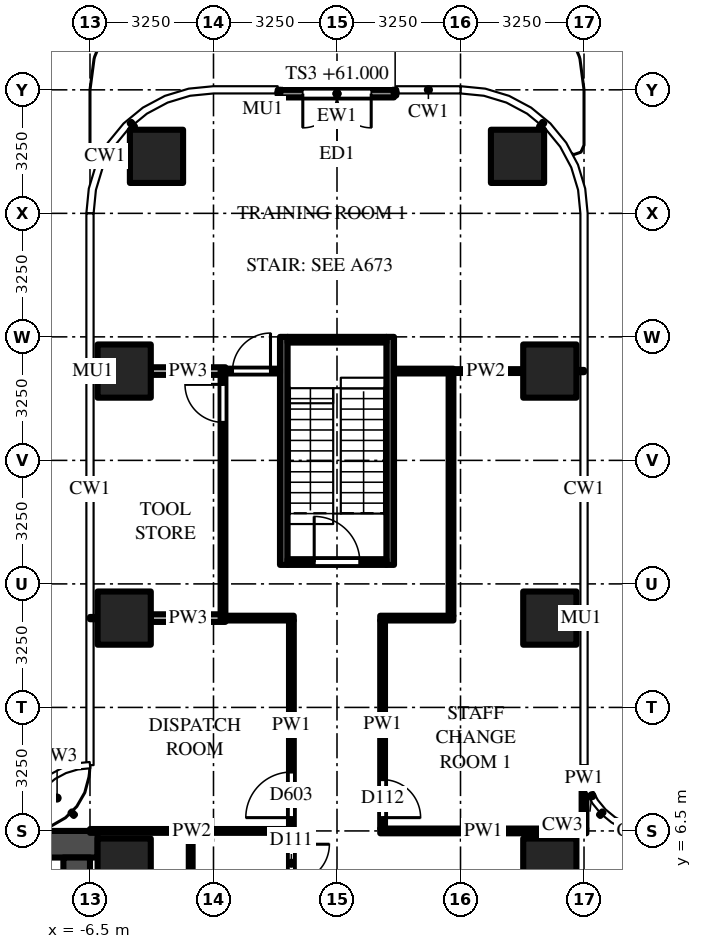
"""IFC4 building model, lengths in metres.
Left out: names, types, materials, properties, quantities, classifications, styles, units other than length and angle.
Written with IfcOpenShell. Run it as: python <this file> out.ifc"""

import sys

from ifc_helpers import new_model, si_unit, direction, frame, frame_2d, origin, origin_2d, place, context, subcontext, project, spatial, rectangle, extrude, source, transform, mapped, element, fill, save


model = new_model("IFC4")
c1 = context("Model", 3, precision=1e-05, world=origin(), true_north=direction((0.0, 1.0)))
c2 = subcontext(c1, "Body", "Model", "MODEL_VIEW")
j1 = project(units=[si_unit("LENGTHUNIT", "METRE"), si_unit("PLANEANGLEUNIT", "RADIAN")], contexts=[c1])
p1 = place(None, origin())
s1 = spatial("IfcSite", under=j1, at=p1, CompositionType="ELEMENT")
p2 = place(p1, origin())
s2 = spatial("IfcBuilding", under=s1, at=p2, CompositionType="ELEMENT")
p3 = place(p2, frame((0.0, 0.0, 61.0)))
s3 = spatial("IfcBuildingStorey", under=s2, at=p3, CompositionType="ELEMENT", Elevation=61.0)
m1 = source(origin(), c2, "Body", "SweptSolid", [
    extrude(rectangle(XDim=1.4, YDim=1.4, at=origin_2d()), origin(), (0.0, 0.0, 1.0), 4.5),
])
for number, where, z_axis, x_axis in (
    (1, (-5.6, 12.1, 0.0), (0.0, 0.0, 1.0), (1.0, 0.0, 0.0)),
    (2, (-5.6, 18.6, 0.0), (0.0, 0.0, 1.0), (1.0, 0.0, 0.0)),
    (3, (-4.75, 24.25, 0.0), (0.0, 0.0, 1.0), (1.0, 0.0, 0.0)),
    (4, (5.6, 12.1, 0.0), (0.0, 0.0, 1.0), (1.0, 0.0, 0.0)),
    (5, (5.6, 18.6, 0.0), (0.0, 0.0, 1.0), (1.0, 0.0, 0.0)),
    (6, (4.75, 24.25, 0.0), (0.0, 0.0, 1.0), (1.0, 0.0, 0.0)),
    (7, (5.6, 5.6, 0.0), (0.0, 0.0, 1.0), (1.0, 0.0, 0.0)),
    (8, (-5.6, 5.6, 0.0), (0.0, 0.0, 1.0), (1.0, 0.0, 0.0)),
):
    element("IfcColumn", number, at=place(p3, frame(where, z_axis=z_axis, x_axis=x_axis)), inside=s3, PredefinedType="COLUMN", context=c2, shape_type="MappedRepresentation", body=[
        mapped(m1, transform((0.0, 0.0, 0.0))),
    ])
m2 = source(origin(), c2, "Body", "SweptSolid", [
    extrude(rectangle(XDim=16.45, YDim=0.7, at=frame_2d((8.225, 0.0))), origin(), (0.0, 0.0, 1.0), 4.25),
])
p4 = place(p3, frame((-6.3, 6.15, 0.0), z_axis=(0.0, 0.0, 1.0), x_axis=(-1.0, 0.0, 0.0)))
e9 = element("IfcWall", 9, at=p4, inside=s3, PredefinedType="SHEAR", context=c2, shape_type="MappedRepresentation", body=[
    mapped(m2, transform((0.0, 0.0, 0.0))),
])
m3 = source(origin(), c2, "Body", "SweptSolid", [
    extrude(rectangle(XDim=9.05, YDim=0.7, at=frame_2d((4.525, 0.0))), origin(), (0.0, 0.0, 1.0), 4.25),
])
p5 = place(p3, frame((-6.85, 5.8, 0.0), z_axis=(0.0, 0.0, 1.0), x_axis=(0.0, -1.0, 0.0)))
e10 = element("IfcWall", 10, at=p5, inside=s3, PredefinedType="SHEAR", context=c2, shape_type="MappedRepresentation", body=[
    mapped(m3, transform((0.0, 0.0, 0.0))),
])
m4 = source(origin(), c2, "Body", "SweptSolid", [
    extrude(rectangle(XDim=1.8, YDim=2.1, at=frame_2d((0.9, 1.05))), frame((0.0, 0.36, 0.0), z_axis=(0.0, -1.0, 0.0), x_axis=(1.0, 0.0, 0.0)), (0.0, 0.0, 1.0), 0.72),
])
p6 = place(p5, frame((3.15, 0.0, 0.0)))
e11 = element("IfcOpeningElement", 11, at=p6, cuts=e10, PredefinedType="OPENING", context=c2, shape_type="MappedRepresentation", body=[
    mapped(m4, transform((0.0, 0.0, 0.0))),
])
m5 = source(origin(), c2, "Body", "SweptSolid", [
    extrude(rectangle(XDim=6.0, YDim=0.2, at=frame_2d((3.0, 0.0))), origin(), (0.0, 0.0, 1.0), 4.25),
])
for number, where, z_axis, x_axis in (
    (12, (-1.4, 13.5, 0.0), (0.0, 0.0, 1.0), (0.0, 1.0, 0.0)),
    (13, (1.4, 13.5, 0.0), (0.0, 0.0, 1.0), (0.0, 1.0, 0.0)),
):
    element("IfcWall", number, at=place(p3, frame(where, z_axis=z_axis, x_axis=x_axis)), inside=s3, PredefinedType="SHEAR", context=c2, shape_type="MappedRepresentation", body=[
        mapped(m5, transform((0.0, 0.0, 0.0))),
    ])
m6 = source(origin(), c2, "Body", "SweptSolid", [
    extrude(rectangle(XDim=2.6, YDim=0.15, at=frame_2d((1.3, 0.0))), origin(), (0.0, 0.0, 1.0), 4.25),
])
p7 = place(p3, frame((-1.3, 13.575, 0.0), z_axis=(0.0, 0.0, 1.0), x_axis=(1.0, 0.0, 0.0)))
e14 = element("IfcWall", 14, at=p7, inside=s3, PredefinedType="SHEAR", context=c2, shape_type="MappedRepresentation", body=[
    mapped(m6, transform((0.0, 0.0, 0.0))),
])
m7 = source(origin(), c2, "Body", "SweptSolid", [
    extrude(rectangle(XDim=1.2, YDim=2.1, at=frame_2d((0.6, 1.05))), frame((0.0, 0.085, 0.0), z_axis=(0.0, -1.0, 0.0), x_axis=(1.0, 0.0, 0.0)), (0.0, 0.0, 1.0), 0.17),
])
p8 = place(p7, frame((0.7, 0.0, 0.0)))
e15 = element("IfcOpeningElement", 15, at=p8, cuts=e14, PredefinedType="OPENING", context=c2, shape_type="MappedRepresentation", body=[
    mapped(m7, transform((0.0, 0.0, 0.0))),
])
p9 = place(p3, frame((-1.3, 19.425, 0.0), z_axis=(0.0, 0.0, 1.0), x_axis=(1.0, 0.0, 0.0)))
e16 = element("IfcWall", 16, at=p9, inside=s3, PredefinedType="SHEAR", context=c2, shape_type="MappedRepresentation", body=[
    mapped(m6, transform((0.0, 0.0, 0.0))),
])
m8 = source(origin(), c2, "Body", "SweptSolid", [
    extrude(rectangle(XDim=3.0, YDim=0.2, at=frame_2d((1.5, 0.0))), origin(), (0.0, 0.0, 1.0), 4.25),
])
p10 = place(p3, frame((1.5, 25.9, 0.0), z_axis=(0.0, 0.0, 1.0), x_axis=(-1.0, 0.0, 0.0)))
e17 = element("IfcWall", 17, at=p10, inside=s3, PredefinedType="SOLIDWALL", context=c2, shape_type="MappedRepresentation", body=[
    mapped(m8, transform((0.0, 0.0, 0.0))),
])
m9 = source(origin(), c2, "Body", "SweptSolid", [
    extrude(rectangle(XDim=1.8, YDim=2.4, at=frame_2d((0.9, 1.2))), frame((0.0, 0.11, 0.0), z_axis=(0.0, -1.0, 0.0), x_axis=(1.0, 0.0, 0.0)), (0.0, 0.0, 1.0), 0.22),
])
p11 = place(p10, frame((0.6, 0.0, 0.0)))
e18 = element("IfcOpeningElement", 18, at=p11, cuts=e17, PredefinedType="OPENING", context=c2, shape_type="MappedRepresentation", body=[
    mapped(m9, transform((0.0, 0.0, 0.0))),
])
m10 = source(origin(), c2, "Body", "SweptSolid", [
    extrude(rectangle(XDim=3.137, YDim=0.1, at=frame_2d((1.569, 0.0))), origin(), (0.0, 0.0, 1.0), 3.468),
])
p12 = place(p3, frame((-3.85, 3.312, 0.0), z_axis=(0.0, 0.0, 1.0), x_axis=(0.0, 1.0, 0.0)))
e19 = element("IfcWall", 19, at=p12, inside=s3, PredefinedType="PARTITIONING", context=c2, shape_type="MappedRepresentation", body=[
    mapped(m10, transform((0.0, 0.0, 0.0))),
])
m11 = source(origin(), c2, "Body", "SweptSolid", [
    extrude(rectangle(XDim=6.3, YDim=0.125, at=frame_2d((3.15, 0.0))), origin(), (0.0, 0.0, 1.0), 3.468),
])
p13 = place(p3, frame((-3.0, 12.2, 0.0), z_axis=(0.0, 0.0, 1.0), x_axis=(0.0, 1.0, 0.0)))
e20 = element("IfcWall", 20, at=p13, inside=s3, PredefinedType="PARTITIONING", context=c2, shape_type="MappedRepresentation", body=[
    mapped(m11, transform((0.0, 0.0, 0.0))),
])
m12 = source(origin(), c2, "Body", "SweptSolid", [
    extrude(rectangle(XDim=1.0, YDim=2.1, at=frame_2d((0.5, 1.05))), frame((0.0, 0.073, 0.0), z_axis=(0.0, -1.0, 0.0), x_axis=(1.0, 0.0, 0.0)), (0.0, 0.0, 1.0), 0.145),
])
p14 = place(p13, frame((5.05, 0.0, 0.0)))
e21 = element("IfcOpeningElement", 21, at=p14, cuts=e20, PredefinedType="OPENING", context=c2, shape_type="MappedRepresentation", body=[
    mapped(m12, transform((0.0, 0.0, 0.0))),
])
m13 = source(origin(), c2, "Body", "SweptSolid", [
    extrude(rectangle(XDim=3.137, YDim=0.125, at=frame_2d((1.569, 0.0))), origin(), (0.0, 0.0, 1.0), 3.468),
])
p15 = place(p3, frame((-1.2, 6.45, 0.0), z_axis=(0.0, 0.0, 1.0), x_axis=(0.0, -1.0, 0.0)))
e22 = element("IfcWall", 22, at=p15, inside=s3, PredefinedType="PARTITIONING", context=c2, shape_type="MappedRepresentation", body=[
    mapped(m13, transform((0.0, 0.0, 0.0))),
])
p16 = place(p15, frame((0.3, 0.0, 0.0)))
e23 = element("IfcOpeningElement", 23, at=p16, cuts=e22, PredefinedType="OPENING", context=c2, shape_type="MappedRepresentation", body=[
    mapped(m12, transform((0.0, 0.0, 0.0))),
])
m14 = source(origin(), c2, "Body", "SweptSolid", [
    extrude(rectangle(XDim=5.488, YDim=0.125, at=frame_2d((2.744, 0.0))), origin(), (0.0, 0.0, 1.0), 3.468),
])
p17 = place(p3, frame((-1.2, 6.55, 0.0), z_axis=(0.0, 0.0, 1.0), x_axis=(0.0, 1.0, 0.0)))
e24 = element("IfcWall", 24, at=p17, inside=s3, PredefinedType="PARTITIONING", context=c2, shape_type="MappedRepresentation", body=[
    mapped(m14, transform((0.0, 0.0, 0.0))),
])
m15 = source(origin(), c2, "Body", "SweptSolid", [
    extrude(rectangle(XDim=1.2, YDim=2.1, at=frame_2d((0.6, 1.05))), frame((0.0, 0.073, 0.0), z_axis=(0.0, -1.0, 0.0), x_axis=(1.0, 0.0, 0.0)), (0.0, 0.0, 1.0), 0.145),
])
p18 = place(p17, frame((0.3, 0.0, 0.0)))
e25 = element("IfcOpeningElement", 25, at=p18, cuts=e24, PredefinedType="OPENING", context=c2, shape_type="MappedRepresentation", body=[
    mapped(m15, transform((0.0, 0.0, 0.0))),
])
m16 = source(origin(), c2, "Body", "SweptSolid", [
    extrude(rectangle(XDim=5.475, YDim=0.125, at=frame_2d((2.738, 0.0))), origin(), (0.0, 0.0, 1.0), 3.468),
])
p19 = place(p3, frame((1.2, 12.038, 0.0), z_axis=(0.0, 0.0, 1.0), x_axis=(0.0, -1.0, 0.0)))
e26 = element("IfcWall", 26, at=p19, inside=s3, PredefinedType="PARTITIONING", context=c2, shape_type="MappedRepresentation", body=[
    mapped(m16, transform((0.0, 0.0, 0.0))),
])
p20 = place(p19, frame((4.188, 0.0, 0.0)))
e27 = element("IfcOpeningElement", 27, at=p20, cuts=e26, PredefinedType="OPENING", context=c2, shape_type="MappedRepresentation", body=[
    mapped(m12, transform((0.0, 0.0, 0.0))),
])
m17 = source(origin(), c2, "Body", "SweptSolid", [
    extrude(rectangle(XDim=6.387, YDim=0.125, at=frame_2d((3.194, 0.0))), origin(), (0.0, 0.0, 1.0), 3.468),
])
p21 = place(p3, frame((3.0, 18.55, 0.0), z_axis=(0.0, 0.0, 1.0), x_axis=(0.0, -1.0, 0.0)))
e28 = element("IfcWall", 28, at=p21, inside=s3, PredefinedType="PARTITIONING", context=c2, shape_type="MappedRepresentation", body=[
    mapped(m17, transform((0.0, 0.0, 0.0))),
])
m18 = source(origin(), c2, "Body", "SweptSolid", [
    extrude(rectangle(XDim=1.469, YDim=0.125, at=frame_2d((0.734, 0.0))), origin(), (0.0, 0.0, 1.0), 4.25),
])
p22 = place(p3, frame((6.5, 6.562, 0.0), z_axis=(0.0, 0.0, 1.0), x_axis=(0.0, 1.0, 0.0)))
e29 = element("IfcWall", 29, at=p22, inside=s3, PredefinedType="PARTITIONING", context=c2, shape_type="MappedRepresentation", body=[
    mapped(m18, transform((0.0, 0.0, 0.0))),
])
m19 = source(origin(), c2, "Body", "SweptSolid", [
    extrude(rectangle(XDim=5.363, YDim=0.1, at=frame_2d((2.681, 0.0))), origin(), (0.0, 0.0, 1.0), 3.33),
])
p23 = place(p3, frame((-6.5, 6.5, 0.0), z_axis=(0.0, 0.0, 1.0), x_axis=(1.0, 0.0, 0.0)))
e30 = element("IfcWall", 30, at=p23, inside=s3, PredefinedType="PARTITIONING", context=c2, shape_type="MappedRepresentation", body=[
    mapped(m19, transform((0.0, 0.0, 0.0))),
])
m20 = source(origin(), c2, "Body", "SweptSolid", [
    extrude(rectangle(XDim=5.425, YDim=0.125, at=frame_2d((2.712, 0.0))), origin(), (0.0, 0.0, 1.0), 3.33),
])
p24 = place(p3, frame((1.137, 6.5, 0.0), z_axis=(0.0, 0.0, 1.0), x_axis=(1.0, 0.0, 0.0)))
e31 = element("IfcWall", 31, at=p24, inside=s3, PredefinedType="PARTITIONING", context=c2, shape_type="MappedRepresentation", body=[
    mapped(m20, transform((0.0, 0.0, 0.0))),
])
m21 = source(origin(), c2, "Body", "SweptSolid", [
    extrude(rectangle(XDim=1.962, YDim=0.2, at=frame_2d((0.981, 0.0))), origin(), (0.0, 0.0, 1.0), 3.468),
])
p25 = place(p3, frame((-4.9, 12.1, 0.0), z_axis=(0.0, 0.0, 1.0), x_axis=(1.0, 0.0, 0.0)))
e32 = element("IfcWall", 32, at=p25, inside=s3, PredefinedType="PARTITIONING", context=c2, shape_type="MappedRepresentation", body=[
    mapped(m21, transform((0.0, 0.0, 0.0))),
])
m22 = source(origin(), c2, "Body", "SweptSolid", [
    extrude(rectangle(XDim=1.925, YDim=0.125, at=frame_2d((0.962, 0.0))), origin(), (0.0, 0.0, 1.0), 3.468),
])
for number, where, z_axis, x_axis in (
    (33, (-1.137, 12.1, 0.0), (0.0, 0.0, 1.0), (-1.0, 0.0, 0.0)),
    (34, (3.062, 12.1, 0.0), (0.0, 0.0, 1.0), (-1.0, 0.0, 0.0)),
):
    element("IfcWall", number, at=place(p3, frame(where, z_axis=z_axis, x_axis=x_axis)), inside=s3, PredefinedType="PARTITIONING", context=c2, shape_type="MappedRepresentation", body=[
        mapped(m22, transform((0.0, 0.0, 0.0))),
    ])
m23 = source(origin(), c2, "Body", "SweptSolid", [
    extrude(rectangle(XDim=1.962, YDim=0.2, at=frame_2d((0.981, 0.0))), origin(), (0.0, 0.0, 1.0), 3.697),
])
p26 = place(p3, frame((-4.9, 18.6, 0.0), z_axis=(0.0, 0.0, 1.0), x_axis=(1.0, 0.0, 0.0)))
e35 = element("IfcWall", 35, at=p26, inside=s3, PredefinedType="PARTITIONING", context=c2, shape_type="MappedRepresentation", body=[
    mapped(m23, transform((0.0, 0.0, 0.0))),
])
m24 = source(origin(), c2, "Body", "SweptSolid", [
    extrude(rectangle(XDim=1.962, YDim=0.1, at=frame_2d((0.981, 0.0))), origin(), (0.0, 0.0, 1.0), 3.697),
])
p27 = place(p3, frame((2.938, 18.6, 0.0), z_axis=(0.0, 0.0, 1.0), x_axis=(1.0, 0.0, 0.0)))
e36 = element("IfcWall", 36, at=p27, inside=s3, PredefinedType="PARTITIONING", context=c2, shape_type="MappedRepresentation", body=[
    mapped(m24, transform((0.0, 0.0, 0.0))),
])
m25 = source(origin(), c2, "Body", "SweptSolid", [
    extrude(rectangle(XDim=1.562, YDim=0.125, at=frame_2d((0.781, 0.0))), origin(), (0.0, 0.0, 1.0), 3.697),
])
p28 = place(p3, frame((-3.062, 18.6, 0.0), z_axis=(0.0, 0.0, 1.0), x_axis=(1.0, 0.0, 0.0)))
e37 = element("IfcWall", 37, at=p28, inside=s3, PredefinedType="PARTITIONING", context=c2, shape_type="MappedRepresentation", body=[
    mapped(m25, transform((0.0, 0.0, 0.0))),
])
p29 = place(p28, frame((0.312, 0.0, 0.0)))
e38 = element("IfcOpeningElement", 38, at=p29, cuts=e37, PredefinedType="OPENING", context=c2, shape_type="MappedRepresentation", body=[
    mapped(m12, transform((0.0, 0.0, 0.0))),
])
p30 = place(p3, frame((1.5, 18.6, 0.0), z_axis=(0.0, 0.0, 1.0), x_axis=(1.0, 0.0, 0.0)))
e39 = element("IfcWall", 39, at=p30, inside=s3, PredefinedType="PARTITIONING", context=c2, shape_type="MappedRepresentation", body=[
    mapped(m25, transform((0.0, 0.0, 0.0))),
])
m26 = source(origin(), c2, "Body", "SweptSolid", [
    extrude(rectangle(XDim=1.2, YDim=2.1, at=frame_2d((0.6, 1.05))), frame((0.0, 0.025, 0.0), z_axis=(0.0, -1.0, 0.0), x_axis=(1.0, 0.0, 0.0)), (0.0, 0.0, 1.0), 0.05),
])
p31 = place(p8, origin())
e40 = element("IfcDoor", 40, at=p31, inside=s3, OperationType="SINGLE_SWING_LEFT", PredefinedType="DOOR", context=c2, shape_type="MappedRepresentation", body=[
    mapped(m26, transform((0.0, 0.0, 0.0))),
])
fill(e15, e40)
m27 = source(origin(), c2, "Body", "SweptSolid", [
    extrude(rectangle(XDim=1.8, YDim=2.4, at=frame_2d((0.9, 1.2))), frame((0.0, 0.025, 0.0), z_axis=(0.0, -1.0, 0.0), x_axis=(1.0, 0.0, 0.0)), (0.0, 0.0, 1.0), 0.05),
])
p32 = place(p11, origin())
e41 = element("IfcDoor", 41, at=p32, inside=s3, OperationType="DOUBLE_DOOR_SINGLE_SWING", PredefinedType="DOOR", context=c2, shape_type="MappedRepresentation", body=[
    mapped(m27, transform((0.0, 0.0, 0.0))),
])
fill(e18, e41)
m28 = source(origin(), c2, "Body", "SweptSolid", [
    extrude(rectangle(XDim=1.0, YDim=2.1, at=frame_2d((0.5, 1.05))), frame((0.0, 0.025, 0.0), z_axis=(0.0, -1.0, 0.0), x_axis=(1.0, 0.0, 0.0)), (0.0, 0.0, 1.0), 0.05),
])
p33 = place(p16, origin())
e42 = element("IfcDoor", 42, at=p33, inside=s3, OperationType="SINGLE_SWING_LEFT", PredefinedType="DOOR", context=c2, shape_type="MappedRepresentation", body=[
    mapped(m28, transform((0.0, 0.0, 0.0))),
])
fill(e23, e42)
p34 = place(p20, origin())
e43 = element("IfcDoor", 43, at=p34, inside=s3, OperationType="SINGLE_SWING_RIGHT", PredefinedType="DOOR", context=c2, shape_type="MappedRepresentation", body=[
    mapped(m28, transform((0.0, 0.0, 0.0))),
])
fill(e27, e43)
p35 = place(p18, origin())
e44 = element("IfcDoor", 44, at=p35, inside=s3, OperationType="SINGLE_SWING_LEFT", PredefinedType="DOOR", context=c2, shape_type="MappedRepresentation", body=[
    mapped(m26, transform((0.0, 0.0, 0.0))),
])
fill(e25, e44)
p36 = place(p14, origin())
e45 = element("IfcDoor", 45, at=p36, inside=s3, OperationType="SINGLE_SWING_RIGHT", PredefinedType="DOOR", context=c2, shape_type="MappedRepresentation", body=[
    mapped(m28, transform((0.0, 0.0, 0.0))),
])
fill(e21, e45)
p37 = place(p29, origin())
e46 = element("IfcDoor", 46, at=p37, inside=s3, OperationType="SINGLE_SWING_RIGHT", PredefinedType="DOOR", context=c2, shape_type="MappedRepresentation", body=[
    mapped(m28, transform((0.0, 0.0, 0.0))),
])
fill(e38, e46)
save(model, sys.argv[1])
